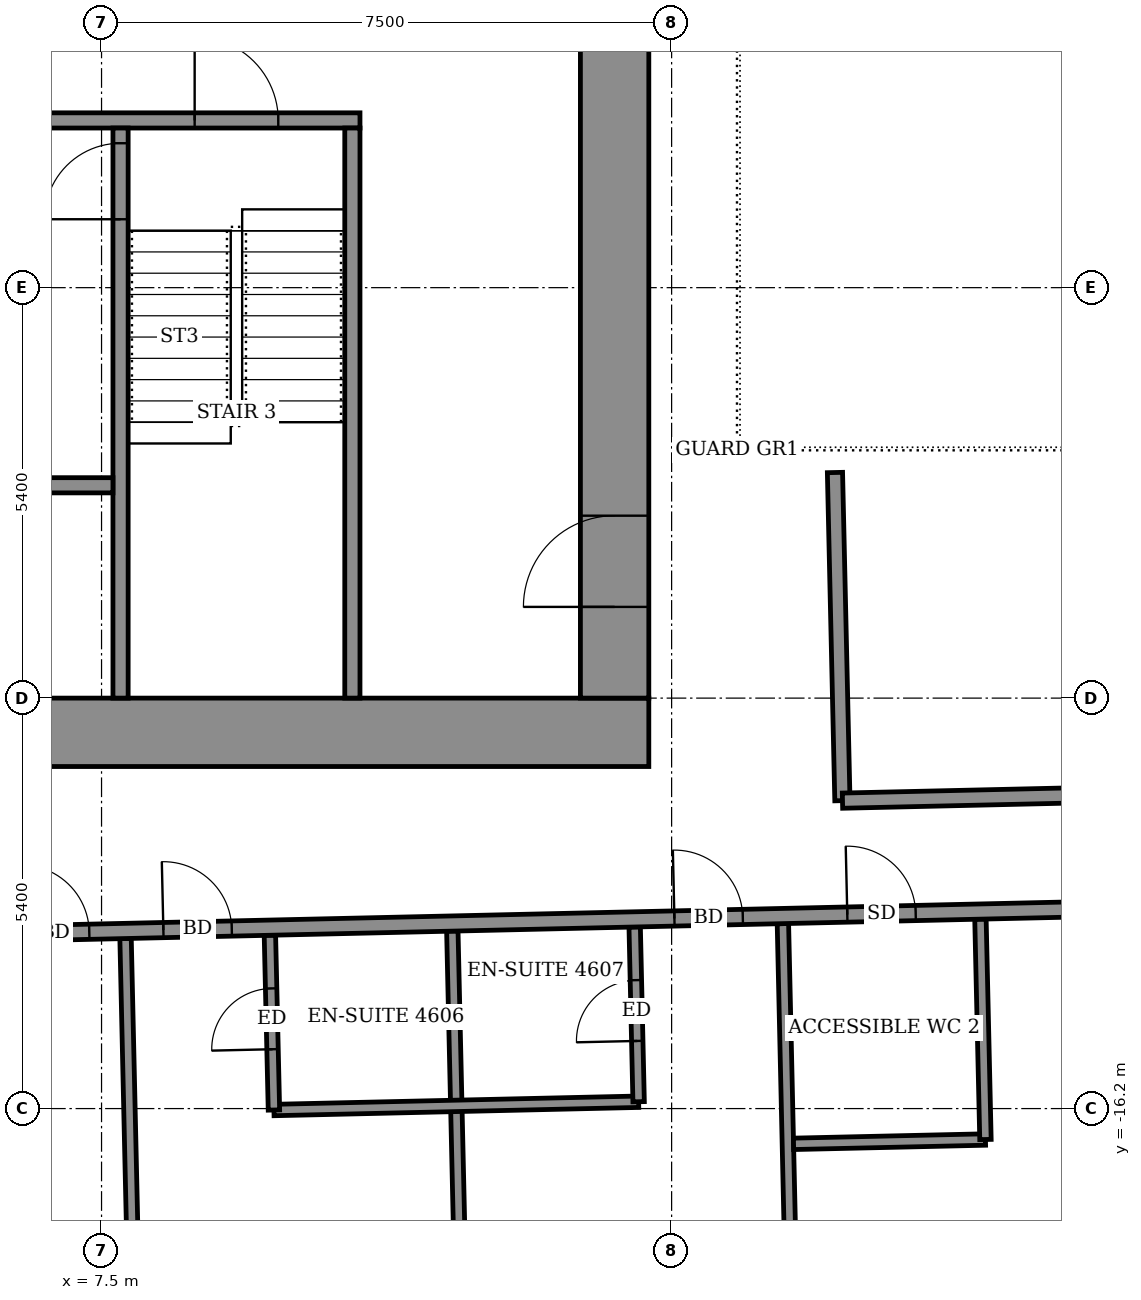
"""IFC4 building model, lengths in metres.
Left out: names, types, materials, properties, quantities, classifications, styles, units other than length and angle.
Written with IfcOpenShell. Run it as: python <this file> out.ifc"""

import sys

from ifc_helpers import new_model, si_unit, direction, frame, frame_2d, origin, place, context, subcontext, project, spatial, rectangle, extrude, element, fill, save


model = new_model("IFC4")
c1 = context("Model", 3, precision=1e-05, world=origin(), true_north=direction((0.0, 1.0)))
c2 = subcontext(c1, "Body", "Model", "MODEL_VIEW")
j1 = project(units=[si_unit("LENGTHUNIT", "METRE"), si_unit("PLANEANGLEUNIT", "RADIAN")], contexts=[c1])
p1 = place(None, origin())
s1 = spatial("IfcSite", under=j1, at=p1, CompositionType="ELEMENT")
p2 = place(p1, origin())
s2 = spatial("IfcBuilding", under=s1, at=p2, CompositionType="ELEMENT")
p3 = place(p2, frame((0.0, 0.0, 182.5)))
s3 = spatial("IfcBuildingStorey", under=s2, at=p3, CompositionType="ELEMENT", Elevation=182.5)
p4 = place(p3, frame((7.958, -20.211, 0.0), z_axis=(0.0, 0.0, 1.0), x_axis=(-0.02273560333, 0.999741512763, 0.0)))
e1 = element("IfcWall", 1, at=p4, inside=s3, PredefinedType="PARTITIONING", context=c2, shape_type="SweptSolid", body=[
    extrude(rectangle(XDim=6.25, YDim=0.15, at=frame_2d((3.125, 0.0))), origin(), (0.0, 0.0, 1.0), 3.05),
])
p5 = place(p3, frame((12.257, -20.114, 0.0), z_axis=(0.0, 0.0, 1.0), x_axis=(-0.022732052173, 0.999741593515, 0.0)))
e2 = element("IfcWall", 2, at=p5, inside=s3, PredefinedType="PARTITIONING", context=c2, shape_type="SweptSolid", body=[
    extrude(rectangle(XDim=6.251, YDim=0.15, at=frame_2d((3.125, 0.0))), origin(), (0.0, 0.0, 1.0), 2.55),
])
p6 = place(p3, frame((16.605, -20.015, 0.0), z_axis=(0.0, 0.0, 1.0), x_axis=(-0.022541260291, 0.999745913512, 0.0)))
e3 = element("IfcWall", 3, at=p6, inside=s3, PredefinedType="PARTITIONING", context=c2, shape_type="SweptSolid", body=[
    extrude(rectangle(XDim=6.25, YDim=0.15, at=frame_2d((3.125, 0.0))), origin(), (0.0, 0.0, 1.0), 2.55),
])
p7 = place(p3, frame((16.604, -16.664, 0.0), z_axis=(0.0, 0.0, 1.0), x_axis=(0.999744126128, 0.022620395041, 0.0)))
e4 = element("IfcWall", 4, at=p7, inside=s3, PredefinedType="PARTITIONING", context=c2, shape_type="SweptSolid", body=[
    extrude(rectangle(XDim=2.526, YDim=0.15, at=frame_2d((1.263, 0.0))), origin(), (0.0, 0.0, 1.0), 3.05),
])
p8 = place(p3, frame((19.129, -16.607, 0.0), z_axis=(0.0, 0.0, 1.0), x_axis=(-0.022732880677, 0.999741574676, 0.0)))
e5 = element("IfcWall", 5, at=p8, inside=s3, PredefinedType="PARTITIONING", context=c2, shape_type="SweptSolid", body=[
    extrude(rectangle(XDim=2.9, YDim=0.15, at=frame_2d((1.45, 0.0))), origin(), (0.0, 0.0, 1.0), 3.05),
])
p9 = place(p3, frame((9.768, -16.219, 0.0), z_axis=(0.0, 0.0, 1.0), x_axis=(0.999742570398, 0.022689048768, 0.0)))
e6 = element("IfcWall", 6, at=p9, inside=s3, PredefinedType="PARTITIONING", context=c2, shape_type="SweptSolid", body=[
    extrude(rectangle(XDim=4.799, YDim=0.15, at=frame_2d((2.399, 0.0))), origin(), (0.0, 0.0, 1.0), 3.05),
])
p10 = place(p3, frame((9.768, -16.219, 0.0), z_axis=(0.0, 0.0, 1.0), x_axis=(-0.023037316498, 0.999734605807, 0.0)))
e7 = element("IfcWall", 7, at=p10, inside=s3, PredefinedType="PARTITIONING", context=c2, shape_type="SweptSolid", body=[
    extrude(rectangle(XDim=2.3, YDim=0.15, at=frame_2d((1.15, 0.0))), origin(), (0.0, 0.0, 1.0), 3.05),
])
p11 = place(p10, frame((0.8, 0.0, 0.0)))
e8 = element("IfcOpeningElement", 8, at=p11, cuts=e7, PredefinedType="OPENING", context=c2, shape_type="SweptSolid", body=[
    extrude(rectangle(XDim=0.8, YDim=2.1, at=frame_2d((0.4, 1.05))), frame((0.0, 0.085, 0.0), z_axis=(0.0, -1.0, 0.0), x_axis=(1.0, 0.0, 0.0)), (0.0, 0.0, 1.0), 0.17),
])
p12 = place(p3, frame((14.566, -16.11, 0.0), z_axis=(0.0, 0.0, 1.0), x_axis=(-0.022612884682, 0.999744296031, 0.0)))
e9 = element("IfcWall", 9, at=p12, inside=s3, PredefinedType="PARTITIONING", context=c2, shape_type="SweptSolid", body=[
    extrude(rectangle(XDim=2.3, YDim=0.15, at=frame_2d((1.15, 0.0))), origin(), (0.0, 0.0, 1.0), 3.05),
])
p13 = place(p12, frame((0.8, 0.0, 0.0)))
e10 = element("IfcOpeningElement", 10, at=p13, cuts=e9, PredefinedType="OPENING", context=c2, shape_type="SweptSolid", body=[
    extrude(rectangle(XDim=0.8, YDim=2.1, at=frame_2d((0.4, 1.05))), frame((0.0, 0.085, 0.0), z_axis=(0.0, -1.0, 0.0), x_axis=(1.0, 0.0, 0.0)), (0.0, 0.0, 1.0), 0.17),
])
p14 = place(p3, frame((-21.279, -14.523, 0.0), z_axis=(0.0, 0.0, 1.0), x_axis=(0.999742878501, 0.022675468818, 0.0)))
e11 = element("IfcWall", 11, at=p14, inside=s3, PredefinedType="PARTITIONING", context=c2, shape_type="SweptSolid", body=[
    extrude(rectangle(XDim=46.48, YDim=0.2, at=frame_2d((23.24, 0.0))), origin(), (0.0, 0.0, 1.0), 3.05),
])
p15 = place(p14, frame((1.325, 0.0, 0.0)))
e12 = element("IfcOpeningElement", 12, at=p15, cuts=e11, PredefinedType="OPENING", context=c2, shape_type="SweptSolid", body=[
    extrude(rectangle(XDim=1.0, YDim=2.1, at=frame_2d((0.5, 1.05))), frame((0.0, 0.11, 0.0), z_axis=(0.0, -1.0, 0.0), x_axis=(1.0, 0.0, 0.0)), (0.0, 0.0, 1.0), 0.22),
])
p16 = place(p14, frame((5.9, 0.0, 0.0)))
e13 = element("IfcOpeningElement", 13, at=p16, cuts=e11, PredefinedType="OPENING", context=c2, shape_type="SweptSolid", body=[
    extrude(rectangle(XDim=0.9, YDim=2.1, at=frame_2d((0.45, 1.05))), frame((0.0, 0.11, 0.0), z_axis=(0.0, -1.0, 0.0), x_axis=(1.0, 0.0, 0.0)), (0.0, 0.0, 1.0), 0.22),
])
p17 = place(p14, frame((10.6, 0.0, 0.0)))
e14 = element("IfcOpeningElement", 14, at=p17, cuts=e11, PredefinedType="OPENING", context=c2, shape_type="SweptSolid", body=[
    extrude(rectangle(XDim=0.9, YDim=2.1, at=frame_2d((0.45, 1.05))), frame((0.0, 0.11, 0.0), z_axis=(0.0, -1.0, 0.0), x_axis=(1.0, 0.0, 0.0)), (0.0, 0.0, 1.0), 0.22),
])
p18 = place(p14, frame((12.525, 0.0, 0.0)))
e15 = element("IfcOpeningElement", 15, at=p18, cuts=e11, PredefinedType="OPENING", context=c2, shape_type="SweptSolid", body=[
    extrude(rectangle(XDim=0.9, YDim=2.1, at=frame_2d((0.45, 1.05))), frame((0.0, 0.11, 0.0), z_axis=(0.0, -1.0, 0.0), x_axis=(1.0, 0.0, 0.0)), (0.0, 0.0, 1.0), 0.22),
])
p19 = place(p14, frame((19.175, 0.0, 0.0)))
e16 = element("IfcOpeningElement", 16, at=p19, cuts=e11, PredefinedType="OPENING", context=c2, shape_type="SweptSolid", body=[
    extrude(rectangle(XDim=0.9, YDim=2.1, at=frame_2d((0.45, 1.05))), frame((0.0, 0.11, 0.0), z_axis=(0.0, -1.0, 0.0), x_axis=(1.0, 0.0, 0.0)), (0.0, 0.0, 1.0), 0.22),
])
p20 = place(p14, frame((21.05, 0.0, 0.0)))
e17 = element("IfcOpeningElement", 17, at=p20, cuts=e11, PredefinedType="OPENING", context=c2, shape_type="SweptSolid", body=[
    extrude(rectangle(XDim=0.9, YDim=2.1, at=frame_2d((0.45, 1.05))), frame((0.0, 0.11, 0.0), z_axis=(0.0, -1.0, 0.0), x_axis=(1.0, 0.0, 0.0)), (0.0, 0.0, 1.0), 0.22),
])
p21 = place(p14, frame((27.725, 0.0, 0.0)))
e18 = element("IfcOpeningElement", 18, at=p21, cuts=e11, PredefinedType="OPENING", context=c2, shape_type="SweptSolid", body=[
    extrude(rectangle(XDim=0.9, YDim=2.1, at=frame_2d((0.45, 1.05))), frame((0.0, 0.11, 0.0), z_axis=(0.0, -1.0, 0.0), x_axis=(1.0, 0.0, 0.0)), (0.0, 0.0, 1.0), 0.22),
])
p22 = place(p14, frame((29.6, 0.0, 0.0)))
e19 = element("IfcOpeningElement", 19, at=p22, cuts=e11, PredefinedType="OPENING", context=c2, shape_type="SweptSolid", body=[
    extrude(rectangle(XDim=0.9, YDim=2.1, at=frame_2d((0.45, 1.05))), frame((0.0, 0.11, 0.0), z_axis=(0.0, -1.0, 0.0), x_axis=(1.0, 0.0, 0.0)), (0.0, 0.0, 1.0), 0.22),
])
p23 = place(p14, frame((36.325, 0.0, 0.0)))
e20 = element("IfcOpeningElement", 20, at=p23, cuts=e11, PredefinedType="OPENING", context=c2, shape_type="SweptSolid", body=[
    extrude(rectangle(XDim=0.9, YDim=2.1, at=frame_2d((0.45, 1.05))), frame((0.0, 0.11, 0.0), z_axis=(0.0, -1.0, 0.0), x_axis=(1.0, 0.0, 0.0)), (0.0, 0.0, 1.0), 0.22),
])
p24 = place(p14, frame((43.915, 0.0, 0.0)))
e21 = element("IfcOpeningElement", 21, at=p24, cuts=e11, PredefinedType="OPENING", context=c2, shape_type="SweptSolid", body=[
    extrude(rectangle(XDim=1.0, YDim=2.1, at=frame_2d((0.5, 1.05))), frame((0.0, 0.11, 0.0), z_axis=(0.0, -1.0, 0.0), x_axis=(1.0, 0.0, 0.0)), (0.0, 0.0, 1.0), 0.22),
])
p25 = place(p14, frame((38.6, 0.0, 0.0)))
e22 = element("IfcOpeningElement", 22, at=p25, cuts=e11, PredefinedType="OPENING", context=c2, shape_type="SweptSolid", body=[
    extrude(rectangle(XDim=0.9, YDim=2.1, at=frame_2d((0.45, 1.05))), frame((0.0, 0.11, 0.0), z_axis=(0.0, -1.0, 0.0), x_axis=(1.0, 0.0, 0.0)), (0.0, 0.0, 1.0), 0.22),
])
p26 = place(p3, frame((17.247, -12.149, 0.0), z_axis=(0.0, 0.0, 1.0), x_axis=(-0.022729111383, 0.999741660378, 0.0)))
e23 = element("IfcWall", 23, at=p26, inside=s3, PredefinedType="PARTITIONING", context=c2, shape_type="SweptSolid", body=[
    extrude(rectangle(XDim=4.318, YDim=0.2, at=frame_2d((2.159, 0.0))), origin(), (0.0, 0.0, 1.0), 3.05),
])
p27 = place(p3, frame((17.248, -12.149, 0.0), z_axis=(0.0, 0.0, 1.0), x_axis=(0.999741181744, 0.022750154412, 0.0)))
e24 = element("IfcWall", 24, at=p27, inside=s3, PredefinedType="PARTITIONING", context=c2, shape_type="SweptSolid", body=[
    extrude(rectangle(XDim=7.909, YDim=0.2, at=frame_2d((3.955, 0.0))), origin(), (0.0, 0.0, 1.0), 3.05),
])
p28 = place(p27, frame((4.155, 0.0, 0.0)))
e25 = element("IfcOpeningElement", 25, at=p28, cuts=e24, PredefinedType="OPENING", context=c2, shape_type="SweptSolid", body=[
    extrude(rectangle(XDim=1.0, YDim=2.1, at=frame_2d((0.5, 1.05))), frame((0.0, 0.11, 0.0), z_axis=(0.0, -1.0, 0.0), x_axis=(1.0, 0.0, 0.0)), (0.0, 0.0, 1.0), 0.22),
])
p29 = place(p3, frame((-14.7, -11.25, 0.0), z_axis=(0.0, 0.0, 1.0), x_axis=(1.0, 0.0, 0.0)))
e26 = element("IfcWall", 26, at=p29, inside=s3, PredefinedType="SHEAR", context=c2, shape_type="SweptSolid", body=[
    extrude(rectangle(XDim=29.4, YDim=0.9, at=frame_2d((14.7, 0.0))), origin(), (0.0, 0.0, 1.0), 3.6),
])
p30 = place(p3, frame((14.25, -10.8, 0.0), z_axis=(0.0, 0.0, 1.0), x_axis=(0.0, 1.0, 0.0)))
e27 = element("IfcWall", 27, at=p30, inside=s3, PredefinedType="SHEAR", context=c2, shape_type="SweptSolid", body=[
    extrude(rectangle(XDim=21.6, YDim=0.9, at=frame_2d((10.8, 0.0))), origin(), (0.0, 0.0, 1.0), 3.6),
])
p31 = place(p30, frame((1.2, 0.0, 0.0)))
e28 = element("IfcOpeningElement", 28, at=p31, cuts=e27, PredefinedType="OPENING", context=c2, shape_type="SweptSolid", body=[
    extrude(rectangle(XDim=1.2, YDim=2.1, at=frame_2d((0.6, 1.05))), frame((0.0, 0.46, 0.0), z_axis=(0.0, -1.0, 0.0), x_axis=(1.0, 0.0, 0.0)), (0.0, 0.0, 1.0), 0.92),
])
p32 = place(p3, frame((-10.9, -3.2, 0.0), z_axis=(0.0, 0.0, 1.0), x_axis=(1.0, 0.0, 0.0)))
e29 = element("IfcWall", 29, at=p32, inside=s3, PredefinedType="SHEAR", context=c2, shape_type="SweptSolid", body=[
    extrude(rectangle(XDim=21.8, YDim=0.2, at=frame_2d((10.9, 0.0))), origin(), (0.0, 0.0, 1.0), 3.05),
])
p33 = place(p32, frame((1.075, 0.0, 0.0)))
e30 = element("IfcOpeningElement", 30, at=p33, cuts=e29, PredefinedType="OPENING", context=c2, shape_type="SweptSolid", body=[
    extrude(rectangle(XDim=1.1, YDim=2.1, at=frame_2d((0.55, 1.05))), frame((0.0, 0.11, 0.0), z_axis=(0.0, -1.0, 0.0), x_axis=(1.0, 0.0, 0.0)), (0.0, 0.0, 1.0), 0.22),
])
p34 = place(p32, frame((10.325, 0.0, 0.0)))
e31 = element("IfcOpeningElement", 31, at=p34, cuts=e29, PredefinedType="OPENING", context=c2, shape_type="SweptSolid", body=[
    extrude(rectangle(XDim=1.1, YDim=2.1, at=frame_2d((0.55, 1.05))), frame((0.0, 0.11, 0.0), z_axis=(0.0, -1.0, 0.0), x_axis=(1.0, 0.0, 0.0)), (0.0, 0.0, 1.0), 0.22),
])
p35 = place(p32, frame((19.625, 0.0, 0.0)))
e32 = element("IfcOpeningElement", 32, at=p35, cuts=e29, PredefinedType="OPENING", context=c2, shape_type="SweptSolid", body=[
    extrude(rectangle(XDim=1.1, YDim=2.1, at=frame_2d((0.55, 1.05))), frame((0.0, 0.11, 0.0), z_axis=(0.0, -1.0, 0.0), x_axis=(1.0, 0.0, 0.0)), (0.0, 0.0, 1.0), 0.22),
])
p36 = place(p32, frame((5.7, 0.0, 0.0)))
e33 = element("IfcOpeningElement", 33, at=p36, cuts=e29, PredefinedType="OPENING", context=c2, shape_type="SweptSolid", body=[
    extrude(rectangle(XDim=1.1, YDim=2.1, at=frame_2d((0.55, 1.05))), frame((0.0, 0.11, 0.0), z_axis=(0.0, -1.0, 0.0), x_axis=(1.0, 0.0, 0.0)), (0.0, 0.0, 1.0), 0.22),
])
p37 = place(p32, frame((14.975, 0.0, 0.0)))
e34 = element("IfcOpeningElement", 34, at=p37, cuts=e29, PredefinedType="OPENING", context=c2, shape_type="SweptSolid", body=[
    extrude(rectangle(XDim=1.1, YDim=2.1, at=frame_2d((0.55, 1.05))), frame((0.0, 0.11, 0.0), z_axis=(0.0, -1.0, 0.0), x_axis=(1.0, 0.0, 0.0)), (0.0, 0.0, 1.0), 0.22),
])
p38 = place(p3, frame((7.75, -10.8, 0.0), z_axis=(0.0, 0.0, 1.0), x_axis=(0.0, 1.0, 0.0)))
e35 = element("IfcWall", 35, at=p38, inside=s3, PredefinedType="SHEAR", context=c2, shape_type="SweptSolid", body=[
    extrude(rectangle(XDim=7.5, YDim=0.2, at=frame_2d((3.75, 0.0))), origin(), (0.0, 0.0, 1.0), 3.05),
])
p39 = place(p38, frame((6.3, 0.0, 0.0)))
e36 = element("IfcOpeningElement", 36, at=p39, cuts=e35, PredefinedType="OPENING", context=c2, shape_type="SweptSolid", body=[
    extrude(rectangle(XDim=1.0, YDim=2.1, at=frame_2d((0.5, 1.05))), frame((0.0, 0.11, 0.0), z_axis=(0.0, -1.0, 0.0), x_axis=(1.0, 0.0, 0.0)), (0.0, 0.0, 1.0), 0.22),
])
p40 = place(p3, frame((10.8, -10.8, 0.0), z_axis=(0.0, 0.0, 1.0), x_axis=(0.0, 1.0, 0.0)))
e37 = element("IfcWall", 37, at=p40, inside=s3, PredefinedType="SHEAR", context=c2, shape_type="SweptSolid", body=[
    extrude(rectangle(XDim=7.5, YDim=0.2, at=frame_2d((3.75, 0.0))), origin(), (0.0, 0.0, 1.0), 3.05),
])
p41 = place(p3, frame((1.6, -8.0, 0.0), z_axis=(0.0, 0.0, 1.0), x_axis=(1.0, 0.0, 0.0)))
e38 = element("IfcWall", 38, at=p41, inside=s3, PredefinedType="SHEAR", context=c2, shape_type="SweptSolid", body=[
    extrude(rectangle(XDim=6.05, YDim=0.2, at=frame_2d((3.025, 0.0))), origin(), (0.0, 0.0, 1.0), 3.05),
])
p42 = place(p41, frame((0.913, 0.0, 0.0)))
e39 = element("IfcOpeningElement", 39, at=p42, cuts=e38, PredefinedType="OPENING", context=c2, shape_type="SweptSolid", body=[
    extrude(rectangle(XDim=1.1, YDim=2.1, at=frame_2d((0.55, 1.05))), frame((0.0, 0.11, 0.0), z_axis=(0.0, -1.0, 0.0), x_axis=(1.0, 0.0, 0.0)), (0.0, 0.0, 1.0), 0.22),
])
p43 = place(p41, frame((4.038, 0.0, 0.0)))
e40 = element("IfcOpeningElement", 40, at=p43, cuts=e38, PredefinedType="OPENING", context=c2, shape_type="SweptSolid", body=[
    extrude(rectangle(XDim=1.1, YDim=2.1, at=frame_2d((0.55, 1.05))), frame((0.0, 0.11, 0.0), z_axis=(0.0, -1.0, 0.0), x_axis=(1.0, 0.0, 0.0)), (0.0, 0.0, 1.0), 0.22),
])
p44 = place(p21, origin())
e41 = element("IfcDoor", 41, at=p44, inside=s3, OperationType="SINGLE_SWING_LEFT", PredefinedType="DOOR", context=c2, shape_type="SweptSolid", body=[
    extrude(rectangle(XDim=0.9, YDim=2.1, at=frame_2d((0.45, 1.05))), frame((0.0, 0.025, 0.0), z_axis=(0.0, -1.0, 0.0), x_axis=(1.0, 0.0, 0.0)), (0.0, 0.0, 1.0), 0.05),
])
fill(e18, e41)
p45 = place(p22, origin())
e42 = element("IfcDoor", 42, at=p45, inside=s3, OperationType="SINGLE_SWING_RIGHT", PredefinedType="DOOR", context=c2, shape_type="SweptSolid", body=[
    extrude(rectangle(XDim=0.9, YDim=2.1, at=frame_2d((0.45, 1.05))), frame((0.0, 0.025, 0.0), z_axis=(0.0, -1.0, 0.0), x_axis=(1.0, 0.0, 0.0)), (0.0, 0.0, 1.0), 0.05),
])
fill(e19, e42)
p46 = place(p11, origin())
e43 = element("IfcDoor", 43, at=p46, inside=s3, OperationType="SINGLE_SWING_RIGHT", PredefinedType="DOOR", context=c2, shape_type="SweptSolid", body=[
    extrude(rectangle(XDim=0.8, YDim=2.1, at=frame_2d((0.4, 1.05))), frame((0.0, 0.025, 0.0), z_axis=(0.0, -1.0, 0.0), x_axis=(1.0, 0.0, 0.0)), (0.0, 0.0, 1.0), 0.05),
])
fill(e8, e43)
p47 = place(p23, origin())
e44 = element("IfcDoor", 44, at=p47, inside=s3, OperationType="SINGLE_SWING_LEFT", PredefinedType="DOOR", context=c2, shape_type="SweptSolid", body=[
    extrude(rectangle(XDim=0.9, YDim=2.1, at=frame_2d((0.45, 1.05))), frame((0.0, 0.025, 0.0), z_axis=(0.0, -1.0, 0.0), x_axis=(1.0, 0.0, 0.0)), (0.0, 0.0, 1.0), 0.05),
])
fill(e20, e44)
p48 = place(p13, origin())
e45 = element("IfcDoor", 45, at=p48, inside=s3, OperationType="SINGLE_SWING_LEFT", PredefinedType="DOOR", context=c2, shape_type="SweptSolid", body=[
    extrude(rectangle(XDim=0.8, YDim=2.1, at=frame_2d((0.4, 1.05))), frame((0.0, 0.025, 0.0), z_axis=(0.0, -1.0, 0.0), x_axis=(1.0, 0.0, 0.0)), (0.0, 0.0, 1.0), 0.05),
])
fill(e10, e45)
p49 = place(p25, origin())
e46 = element("IfcDoor", 46, at=p49, inside=s3, OperationType="SINGLE_SWING_RIGHT", PredefinedType="DOOR", context=c2, shape_type="SweptSolid", body=[
    extrude(rectangle(XDim=0.9, YDim=2.1, at=frame_2d((0.45, 1.05))), frame((0.0, 0.025, 0.0), z_axis=(0.0, -1.0, 0.0), x_axis=(1.0, 0.0, 0.0)), (0.0, 0.0, 1.0), 0.05),
])
fill(e22, e46)
p50 = place(p31, origin())
e47 = element("IfcDoor", 47, at=p50, inside=s3, OperationType="DOUBLE_DOOR_SINGLE_SWING", PredefinedType="DOOR", context=c2, shape_type="SweptSolid", body=[
    extrude(rectangle(XDim=1.2, YDim=2.1, at=frame_2d((0.6, 1.05))), frame((0.0, 0.025, 0.0), z_axis=(0.0, -1.0, 0.0), x_axis=(1.0, 0.0, 0.0)), (0.0, 0.0, 1.0), 0.05),
])
fill(e28, e47)
p51 = place(p35, origin())
e48 = element("IfcDoor", 48, at=p51, inside=s3, OperationType="SINGLE_SWING_RIGHT", PredefinedType="DOOR", context=c2, shape_type="SweptSolid", body=[
    extrude(rectangle(XDim=1.1, YDim=2.1, at=frame_2d((0.55, 1.05))), frame((0.0, 0.025, 0.0), z_axis=(0.0, -1.0, 0.0), x_axis=(1.0, 0.0, 0.0)), (0.0, 0.0, 1.0), 0.05),
])
fill(e32, e48)
p52 = place(p39, origin())
e49 = element("IfcDoor", 49, at=p52, inside=s3, OperationType="SINGLE_SWING_RIGHT", PredefinedType="DOOR", context=c2, shape_type="SweptSolid", body=[
    extrude(rectangle(XDim=1.0, YDim=2.1, at=frame_2d((0.5, 1.05))), frame((0.0, 0.025, 0.0), z_axis=(0.0, -1.0, 0.0), x_axis=(1.0, 0.0, 0.0)), (0.0, 0.0, 1.0), 0.05),
])
fill(e36, e49)
save(model, sys.argv[1])
